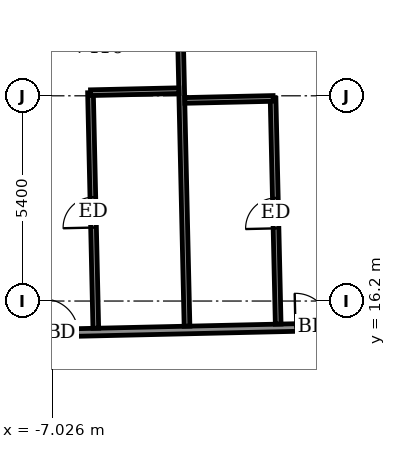
"""IFC4 building model, lengths in metres.
Left out: names, types, materials, properties, quantities, classifications, styles, units other than length and angle.
Written with IfcOpenShell. Run it as: python <this file> out.ifc"""

import sys

from ifc_helpers import new_model, si_unit, direction, frame, frame_2d, origin, place, context, subcontext, project, spatial, rectangle, extrude, element, fill, save


model = new_model("IFC4")
c1 = context("Model", 3, precision=1e-05, world=origin(), true_north=direction((0.0, 1.0)))
c2 = subcontext(c1, "Body", "Model", "MODEL_VIEW")
j1 = project(units=[si_unit("LENGTHUNIT", "METRE"), si_unit("PLANEANGLEUNIT", "RADIAN")], contexts=[c1])
p1 = place(None, origin())
s1 = spatial("IfcSite", under=j1, at=p1, CompositionType="ELEMENT")
p2 = place(p1, origin())
s2 = spatial("IfcBuilding", under=s1, at=p2, CompositionType="ELEMENT")
p3 = place(p2, frame((0.0, 0.0, 290.7)))
s3 = spatial("IfcBuildingStorey", under=s2, at=p3, CompositionType="ELEMENT", Elevation=290.7)
p4 = place(p3, frame((-26.401, 14.918, 0.0), z_axis=(0.0, 0.0, 1.0), x_axis=(0.99974239733, 0.022696673341, 0.0)))
e1 = element("IfcWall", 1, at=p4, inside=s3, PredefinedType="PARTITIONING", context=c2, shape_type="SweptSolid", body=[
    extrude(rectangle(XDim=55.386, YDim=0.2, at=frame_2d((27.693, 0.0))), origin(), (0.0, 0.0, 1.0), 3.05),
])
p5 = place(p4, frame((53.718, 0.0, 0.0)))
e2 = element("IfcOpeningElement", 2, at=p5, cuts=e1, PredefinedType="OPENING", context=c2, shape_type="SweptSolid", body=[
    extrude(rectangle(XDim=1.0, YDim=2.1, at=frame_2d((0.5, 1.05))), frame((0.0, 0.11, 0.0), z_axis=(0.0, -1.0, 0.0), x_axis=(1.0, 0.0, 0.0)), (0.0, 0.0, 1.0), 0.22),
])
p6 = place(p4, frame((49.325, 0.0, 0.0)))
e3 = element("IfcOpeningElement", 3, at=p6, cuts=e1, PredefinedType="OPENING", context=c2, shape_type="SweptSolid", body=[
    extrude(rectangle(XDim=0.9, YDim=2.1, at=frame_2d((0.45, 1.05))), frame((0.0, 0.11, 0.0), z_axis=(0.0, -1.0, 0.0), x_axis=(1.0, 0.0, 0.0)), (0.0, 0.0, 1.0), 0.22),
])
p7 = place(p4, frame((44.575, 0.0, 0.0)))
e4 = element("IfcOpeningElement", 4, at=p7, cuts=e1, PredefinedType="OPENING", context=c2, shape_type="SweptSolid", body=[
    extrude(rectangle(XDim=0.9, YDim=2.1, at=frame_2d((0.45, 1.05))), frame((0.0, 0.11, 0.0), z_axis=(0.0, -1.0, 0.0), x_axis=(1.0, 0.0, 0.0)), (0.0, 0.0, 1.0), 0.22),
])
p8 = place(p4, frame((42.725, 0.0, 0.0)))
e5 = element("IfcOpeningElement", 5, at=p8, cuts=e1, PredefinedType="OPENING", context=c2, shape_type="SweptSolid", body=[
    extrude(rectangle(XDim=0.9, YDim=2.1, at=frame_2d((0.45, 1.05))), frame((0.0, 0.11, 0.0), z_axis=(0.0, -1.0, 0.0), x_axis=(1.0, 0.0, 0.0)), (0.0, 0.0, 1.0), 0.22),
])
p9 = place(p4, frame((36.1, 0.0, 0.0)))
e6 = element("IfcOpeningElement", 6, at=p9, cuts=e1, PredefinedType="OPENING", context=c2, shape_type="SweptSolid", body=[
    extrude(rectangle(XDim=0.9, YDim=2.1, at=frame_2d((0.45, 1.05))), frame((0.0, 0.11, 0.0), z_axis=(0.0, -1.0, 0.0), x_axis=(1.0, 0.0, 0.0)), (0.0, 0.0, 1.0), 0.22),
])
p10 = place(p4, frame((34.25, 0.0, 0.0)))
e7 = element("IfcOpeningElement", 7, at=p10, cuts=e1, PredefinedType="OPENING", context=c2, shape_type="SweptSolid", body=[
    extrude(rectangle(XDim=0.9, YDim=2.1, at=frame_2d((0.45, 1.05))), frame((0.0, 0.11, 0.0), z_axis=(0.0, -1.0, 0.0), x_axis=(1.0, 0.0, 0.0)), (0.0, 0.0, 1.0), 0.22),
])
p11 = place(p4, frame((27.6, 0.0, 0.0)))
e8 = element("IfcOpeningElement", 8, at=p11, cuts=e1, PredefinedType="OPENING", context=c2, shape_type="SweptSolid", body=[
    extrude(rectangle(XDim=0.9, YDim=2.1, at=frame_2d((0.45, 1.05))), frame((0.0, 0.11, 0.0), z_axis=(0.0, -1.0, 0.0), x_axis=(1.0, 0.0, 0.0)), (0.0, 0.0, 1.0), 0.22),
])
p12 = place(p4, frame((25.775, 0.0, 0.0)))
e9 = element("IfcOpeningElement", 9, at=p12, cuts=e1, PredefinedType="OPENING", context=c2, shape_type="SweptSolid", body=[
    extrude(rectangle(XDim=0.9, YDim=2.1, at=frame_2d((0.45, 1.05))), frame((0.0, 0.11, 0.0), z_axis=(0.0, -1.0, 0.0), x_axis=(1.0, 0.0, 0.0)), (0.0, 0.0, 1.0), 0.22),
])
p13 = place(p4, frame((19.15, 0.0, 0.0)))
e10 = element("IfcOpeningElement", 10, at=p13, cuts=e1, PredefinedType="OPENING", context=c2, shape_type="SweptSolid", body=[
    extrude(rectangle(XDim=0.9, YDim=2.1, at=frame_2d((0.45, 1.05))), frame((0.0, 0.11, 0.0), z_axis=(0.0, -1.0, 0.0), x_axis=(1.0, 0.0, 0.0)), (0.0, 0.0, 1.0), 0.22),
])
p14 = place(p4, frame((17.3, 0.0, 0.0)))
e11 = element("IfcOpeningElement", 11, at=p14, cuts=e1, PredefinedType="OPENING", context=c2, shape_type="SweptSolid", body=[
    extrude(rectangle(XDim=0.9, YDim=2.1, at=frame_2d((0.45, 1.05))), frame((0.0, 0.11, 0.0), z_axis=(0.0, -1.0, 0.0), x_axis=(1.0, 0.0, 0.0)), (0.0, 0.0, 1.0), 0.22),
])
p15 = place(p4, frame((10.65, 0.0, 0.0)))
e12 = element("IfcOpeningElement", 12, at=p15, cuts=e1, PredefinedType="OPENING", context=c2, shape_type="SweptSolid", body=[
    extrude(rectangle(XDim=0.9, YDim=2.1, at=frame_2d((0.45, 1.05))), frame((0.0, 0.11, 0.0), z_axis=(0.0, -1.0, 0.0), x_axis=(1.0, 0.0, 0.0)), (0.0, 0.0, 1.0), 0.22),
])
p16 = place(p4, frame((8.8, 0.0, 0.0)))
e13 = element("IfcOpeningElement", 13, at=p16, cuts=e1, PredefinedType="OPENING", context=c2, shape_type="SweptSolid", body=[
    extrude(rectangle(XDim=0.9, YDim=2.1, at=frame_2d((0.45, 1.05))), frame((0.0, 0.11, 0.0), z_axis=(0.0, -1.0, 0.0), x_axis=(1.0, 0.0, 0.0)), (0.0, 0.0, 1.0), 0.22),
])
p17 = place(p4, frame((1.864, 0.0, 0.0)))
e14 = element("IfcOpeningElement", 14, at=p17, cuts=e1, PredefinedType="OPENING", context=c2, shape_type="SweptSolid", body=[
    extrude(rectangle(XDim=1.0, YDim=2.1, at=frame_2d((0.5, 1.05))), frame((0.0, 0.11, 0.0), z_axis=(0.0, -1.0, 0.0), x_axis=(1.0, 0.0, 0.0)), (0.0, 0.0, 1.0), 0.22),
])
p18 = place(p3, frame((-5.886, 15.484, 0.0), z_axis=(0.0, 0.0, 1.0), x_axis=(-0.022564860101, 0.999745381129, 0.0)))
e15 = element("IfcWall", 15, at=p18, inside=s3, PredefinedType="PARTITIONING", context=c2, shape_type="SweptSolid", body=[
    extrude(rectangle(XDim=6.199, YDim=0.15, at=frame_2d((3.1, 0.0))), origin(), (0.0, 0.0, 1.0), 3.05),
])
p19 = place(p18, frame((2.65, 0.0, 0.0)))
e16 = element("IfcOpeningElement", 16, at=p19, cuts=e15, PredefinedType="OPENING", context=c2, shape_type="SweptSolid", body=[
    extrude(rectangle(XDim=0.8, YDim=2.1, at=frame_2d((0.4, 1.05))), frame((0.0, 0.085, 0.0), z_axis=(0.0, -1.0, 0.0), x_axis=(1.0, 0.0, 0.0)), (0.0, 0.0, 1.0), 0.17),
])
p20 = place(p3, frame((-3.486, 15.538, 0.0), z_axis=(0.0, 0.0, 1.0), x_axis=(-0.022719113715, 0.999741887625, 0.0)))
e17 = element("IfcWall", 17, at=p20, inside=s3, PredefinedType="PARTITIONING", context=c2, shape_type="SweptSolid", body=[
    extrude(rectangle(XDim=12.1, YDim=0.15, at=frame_2d((6.05, 0.0))), origin(), (0.0, 0.0, 1.0), 2.5),
])
p21 = place(p3, frame((-1.087, 15.593, 0.0), z_axis=(0.0, 0.0, 1.0), x_axis=(-0.022730742442, 0.999741623295, 0.0)))
e18 = element("IfcWall", 18, at=p21, inside=s3, PredefinedType="PARTITIONING", context=c2, shape_type="SweptSolid", body=[
    extrude(rectangle(XDim=5.939, YDim=0.15, at=frame_2d((2.97, 0.0))), origin(), (0.0, 0.0, 1.0), 3.05),
])
p22 = place(p21, frame((2.52, 0.0, 0.0)))
e19 = element("IfcOpeningElement", 19, at=p22, cuts=e18, PredefinedType="OPENING", context=c2, shape_type="SweptSolid", body=[
    extrude(rectangle(XDim=0.8, YDim=2.1, at=frame_2d((0.4, 1.05))), frame((0.0, 0.085, 0.0), z_axis=(0.0, -1.0, 0.0), x_axis=(1.0, 0.0, 0.0)), (0.0, 0.0, 1.0), 0.17),
])
for number, where, z_axis, x_axis in (
    (20, (-3.544, 21.478, 0.0), (0.0, 0.0, 1.0), (1.0, 0.023, 0.0)),
    (21, (-6.024, 21.682, 0.0), (0.0, 0.0, 1.0), (1.0, 0.023, 0.0)),
):
    element("IfcWall", number, at=place(p3, frame(where, z_axis=z_axis, x_axis=x_axis)), inside=s3, PredefinedType="PARTITIONING", context=c2, shape_type="SweptSolid", body=[
        extrude(rectangle(XDim=2.324, YDim=0.15, at=frame_2d((1.162, 0.0))), origin(), (0.0, 0.0, 1.0), 3.05),
    ])
p23 = place(p12, origin())
e22 = element("IfcDoor", 22, at=p23, inside=s3, OperationType="SINGLE_SWING_LEFT", PredefinedType="DOOR", context=c2, shape_type="SweptSolid", body=[
    extrude(rectangle(XDim=0.9, YDim=2.1, at=frame_2d((0.45, 1.05))), frame((0.0, 0.025, 0.0), z_axis=(0.0, -1.0, 0.0), x_axis=(1.0, 0.0, 0.0)), (0.0, 0.0, 1.0), 0.05),
])
fill(e9, e22)
p24 = place(p22, origin())
e23 = element("IfcDoor", 23, at=p24, inside=s3, OperationType="SINGLE_SWING_LEFT", PredefinedType="DOOR", context=c2, shape_type="SweptSolid", body=[
    extrude(rectangle(XDim=0.8, YDim=2.1, at=frame_2d((0.4, 1.05))), frame((0.0, 0.025, 0.0), z_axis=(0.0, -1.0, 0.0), x_axis=(1.0, 0.0, 0.0)), (0.0, 0.0, 1.0), 0.05),
])
fill(e19, e23)
p25 = place(p13, origin())
e24 = element("IfcDoor", 24, at=p25, inside=s3, OperationType="SINGLE_SWING_RIGHT", PredefinedType="DOOR", context=c2, shape_type="SweptSolid", body=[
    extrude(rectangle(XDim=0.9, YDim=2.1, at=frame_2d((0.45, 1.05))), frame((0.0, 0.025, 0.0), z_axis=(0.0, -1.0, 0.0), x_axis=(1.0, 0.0, 0.0)), (0.0, 0.0, 1.0), 0.05),
])
fill(e10, e24)
p26 = place(p19, origin())
e25 = element("IfcDoor", 25, at=p26, inside=s3, OperationType="SINGLE_SWING_RIGHT", PredefinedType="DOOR", context=c2, shape_type="SweptSolid", body=[
    extrude(rectangle(XDim=0.8, YDim=2.1, at=frame_2d((0.4, 1.05))), frame((0.0, 0.025, 0.0), z_axis=(0.0, -1.0, 0.0), x_axis=(1.0, 0.0, 0.0)), (0.0, 0.0, 1.0), 0.05),
])
fill(e16, e25)
save(model, sys.argv[1])
